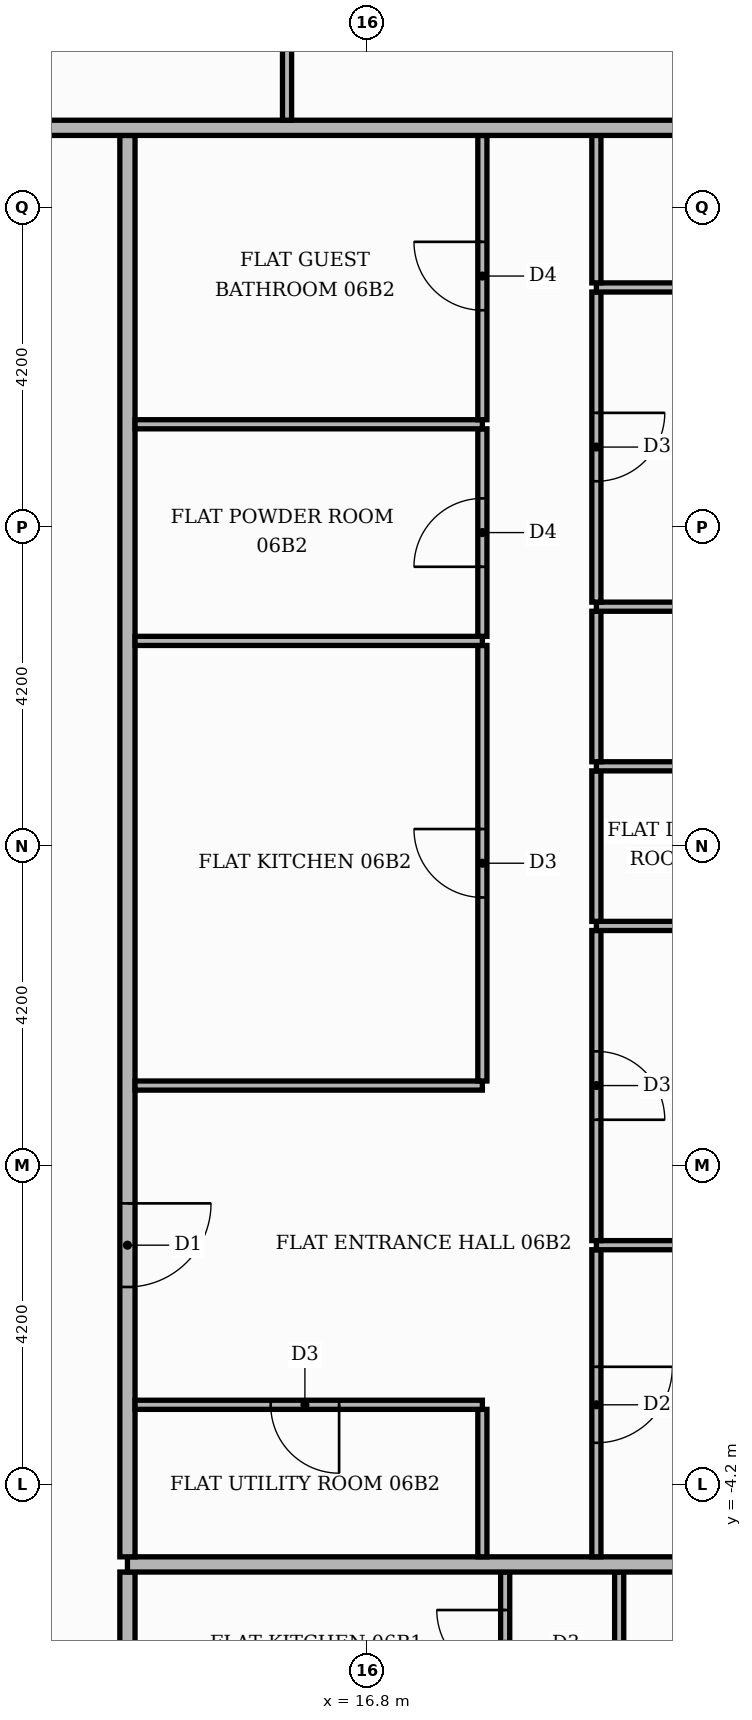
"""IFC4 building model, lengths in metres.
Left out: names, types, materials, properties, quantities, classifications, styles, units other than length and angle.
Written with IfcOpenShell. Run it as: python <this file> out.ifc"""

import sys

from ifc_helpers import new_model, si_unit, direction, frame, frame_2d, origin, place, context, subcontext, project, spatial, rectangle, extrude, element, fill, save


model = new_model("IFC4")
c1 = context("Model", 3, precision=1e-05, world=origin(), true_north=direction((0.0, 1.0)))
c2 = subcontext(c1, "Body", "Model", "MODEL_VIEW")
j1 = project(units=[si_unit("LENGTHUNIT", "METRE"), si_unit("PLANEANGLEUNIT", "RADIAN")], contexts=[c1])
p1 = place(None, origin())
s1 = spatial("IfcSite", under=j1, at=p1, CompositionType="ELEMENT")
p2 = place(p1, origin())
s2 = spatial("IfcBuilding", under=s1, at=p2, CompositionType="ELEMENT")
p3 = place(p2, frame((0.0, 0.0, 30.9)))
s3 = spatial("IfcBuildingStorey", under=s2, at=p3, CompositionType="ELEMENT", Elevation=30.9)
p4 = place(p3, frame((13.65, -13.55, 0.0), z_axis=(0.0, 0.0, 1.0), x_axis=(0.0, 1.0, 0.0)))
e1 = element("IfcWall", 1, at=p4, inside=s3, PredefinedType="PARTITIONING", context=c2, shape_type="SweptSolid", body=[
    extrude(rectangle(XDim=8.2, YDim=0.2, at=frame_2d((4.1, 0.0))), origin(), (0.0, 0.0, 1.0), 3.48),
])
p5 = place(p4, frame((1.45, 0.0, 0.0)))
e2 = element("IfcOpeningElement", 2, at=p5, cuts=e1, PredefinedType="OPENING", context=c2, shape_type="SweptSolid", body=[
    extrude(rectangle(XDim=1.1, YDim=2.4, at=frame_2d((0.55, 1.2))), frame((0.0, 0.11, 0.0), z_axis=(0.0, -1.0, 0.0), x_axis=(1.0, 0.0, 0.0)), (0.0, 0.0, 1.0), 0.22),
])
p6 = place(p3, frame((18.62, -7.29, 0.0), z_axis=(0.0, 0.0, 1.0), x_axis=(0.0, 1.0, 0.0)))
e3 = element("IfcWall", 3, at=p6, inside=s3, PredefinedType="PARTITIONING", context=c2, shape_type="SweptSolid", body=[
    extrude(rectangle(XDim=1.94, YDim=0.12, at=frame_2d((0.97, 0.0))), origin(), (0.0, 0.0, 1.0), 3.48),
])
p7 = place(p6, frame((0.54, 0.0, 0.0)))
e4 = element("IfcOpeningElement", 4, at=p7, cuts=e3, PredefinedType="OPENING", context=c2, shape_type="SweptSolid", body=[
    extrude(rectangle(XDim=0.9, YDim=2.1, at=frame_2d((0.45, 1.05))), frame((0.0, 0.07, 0.0), z_axis=(0.0, -1.0, 0.0), x_axis=(1.0, 0.0, 0.0)), (0.0, 0.0, 1.0), 0.14),
])
p8 = place(p3, frame((20.12, -7.29, 0.0), z_axis=(0.0, 0.0, 1.0), x_axis=(0.0, 1.0, 0.0)))
e5 = element("IfcWall", 5, at=p8, inside=s3, PredefinedType="PARTITIONING", context=c2, shape_type="SweptSolid", body=[
    extrude(rectangle(XDim=1.94, YDim=0.12, at=frame_2d((0.97, 0.0))), origin(), (0.0, 0.0, 1.0), 3.48),
])
p9 = place(p3, frame((13.65, -5.25, 0.0), z_axis=(0.0, 0.0, 1.0), x_axis=(1.0, 0.0, 0.0)))
e6 = element("IfcWall", 6, at=p9, inside=s3, PredefinedType="PARTITIONING", context=c2, shape_type="SweptSolid", body=[
    extrude(rectangle(XDim=11.77, YDim=0.2, at=frame_2d((5.885, 0.0))), origin(), (0.0, 0.0, 1.0), 3.48),
])
p10 = place(p3, frame((13.65, -5.15, 0.0), z_axis=(0.0, 0.0, 1.0), x_axis=(0.0, 1.0, 0.0)))
e7 = element("IfcWall", 7, at=p10, inside=s3, PredefinedType="PARTITIONING", context=c2, shape_type="SweptSolid", body=[
    extrude(rectangle(XDim=18.7, YDim=0.2, at=frame_2d((9.35, 0.0))), origin(), (0.0, 0.0, 1.0), 3.48),
])
p11 = place(p10, frame((3.55, 0.0, 0.0)))
e8 = element("IfcOpeningElement", 8, at=p11, cuts=e7, PredefinedType="OPENING", context=c2, shape_type="SweptSolid", body=[
    extrude(rectangle(XDim=1.1, YDim=2.4, at=frame_2d((0.55, 1.2))), frame((0.0, 0.11, 0.0), z_axis=(0.0, -1.0, 0.0), x_axis=(1.0, 0.0, 0.0)), (0.0, 0.0, 1.0), 0.22),
])
p12 = place(p3, frame((18.32, -5.15, 0.0), z_axis=(0.0, 0.0, 1.0), x_axis=(0.0, 1.0, 0.0)))
e9 = element("IfcWall", 9, at=p12, inside=s3, PredefinedType="PARTITIONING", context=c2, shape_type="SweptSolid", body=[
    extrude(rectangle(XDim=1.94, YDim=0.12, at=frame_2d((0.97, 0.0))), origin(), (0.0, 0.0, 1.0), 3.48),
])
p13 = place(p3, frame((19.82, -5.15, 0.0), z_axis=(0.0, 0.0, 1.0), x_axis=(0.0, 1.0, 0.0)))
e10 = element("IfcWall", 10, at=p13, inside=s3, PredefinedType="PARTITIONING", context=c2, shape_type="SweptSolid", body=[
    extrude(rectangle(XDim=4.04, YDim=0.12, at=frame_2d((2.02, 0.0))), origin(), (0.0, 0.0, 1.0), 3.48),
])
p14 = place(p13, frame((1.5, 0.0, 0.0)))
e11 = element("IfcOpeningElement", 11, at=p14, cuts=e10, PredefinedType="OPENING", context=c2, shape_type="SweptSolid", body=[
    extrude(rectangle(XDim=1.0, YDim=2.1, at=frame_2d((0.5, 1.05))), frame((0.0, 0.07, 0.0), z_axis=(0.0, -1.0, 0.0), x_axis=(1.0, 0.0, 0.0)), (0.0, 0.0, 1.0), 0.14),
])
p15 = place(p3, frame((13.75, -3.15, 0.0), z_axis=(0.0, 0.0, 1.0), x_axis=(1.0, 0.0, 0.0)))
e12 = element("IfcWall", 12, at=p15, inside=s3, PredefinedType="PARTITIONING", context=c2, shape_type="SweptSolid", body=[
    extrude(rectangle(XDim=4.57, YDim=0.12, at=frame_2d((2.285, 0.0))), origin(), (0.0, 0.0, 1.0), 3.48),
])
p16 = place(p15, frame((1.785, 0.0, 0.0)))
e13 = element("IfcOpeningElement", 13, at=p16, cuts=e12, PredefinedType="OPENING", context=c2, shape_type="SweptSolid", body=[
    extrude(rectangle(XDim=0.9, YDim=2.1, at=frame_2d((0.45, 1.05))), frame((0.0, 0.07, 0.0), z_axis=(0.0, -1.0, 0.0), x_axis=(1.0, 0.0, 0.0)), (0.0, 0.0, 1.0), 0.14),
])
p17 = place(p3, frame((19.82, -1.05, 0.0), z_axis=(0.0, 0.0, 1.0), x_axis=(1.0, 0.0, 0.0)))
e14 = element("IfcWall", 14, at=p17, inside=s3, PredefinedType="PARTITIONING", context=c2, shape_type="SweptSolid", body=[
    extrude(rectangle(XDim=5.6, YDim=0.12, at=frame_2d((2.8, 0.0))), origin(), (0.0, 0.0, 1.0), 3.48),
])
p18 = place(p3, frame((19.82, -0.99, 0.0), z_axis=(0.0, 0.0, 1.0), x_axis=(0.0, 1.0, 0.0)))
e15 = element("IfcWall", 15, at=p18, inside=s3, PredefinedType="PARTITIONING", context=c2, shape_type="SweptSolid", body=[
    extrude(rectangle(XDim=4.08, YDim=0.12, at=frame_2d((2.04, 0.0))), origin(), (0.0, 0.0, 1.0), 3.48),
])
p19 = place(p18, frame((1.59, 0.0, 0.0)))
e16 = element("IfcOpeningElement", 16, at=p19, cuts=e15, PredefinedType="OPENING", context=c2, shape_type="SweptSolid", body=[
    extrude(rectangle(XDim=0.9, YDim=2.1, at=frame_2d((0.45, 1.05))), frame((0.0, 0.07, 0.0), z_axis=(0.0, -1.0, 0.0), x_axis=(1.0, 0.0, 0.0)), (0.0, 0.0, 1.0), 0.14),
])
p20 = place(p3, frame((13.75, 1.05, 0.0), z_axis=(0.0, 0.0, 1.0), x_axis=(1.0, 0.0, 0.0)))
e17 = element("IfcWall", 17, at=p20, inside=s3, PredefinedType="PARTITIONING", context=c2, shape_type="SweptSolid", body=[
    extrude(rectangle(XDim=4.57, YDim=0.12, at=frame_2d((2.285, 0.0))), origin(), (0.0, 0.0, 1.0), 3.48),
])
p21 = place(p3, frame((18.32, 1.11, 0.0), z_axis=(0.0, 0.0, 1.0), x_axis=(0.0, 1.0, 0.0)))
e18 = element("IfcWall", 18, at=p21, inside=s3, PredefinedType="PARTITIONING", context=c2, shape_type="SweptSolid", body=[
    extrude(rectangle(XDim=5.73, YDim=0.12, at=frame_2d((2.865, 0.0))), origin(), (0.0, 0.0, 1.0), 3.48),
])
p22 = place(p21, frame((2.415, 0.0, 0.0)))
e19 = element("IfcOpeningElement", 19, at=p22, cuts=e18, PredefinedType="OPENING", context=c2, shape_type="SweptSolid", body=[
    extrude(rectangle(XDim=0.9, YDim=2.1, at=frame_2d((0.45, 1.05))), frame((0.0, 0.07, 0.0), z_axis=(0.0, -1.0, 0.0), x_axis=(1.0, 0.0, 0.0)), (0.0, 0.0, 1.0), 0.14),
])
p23 = place(p3, frame((19.82, 3.15, 0.0), z_axis=(0.0, 0.0, 1.0), x_axis=(1.0, 0.0, 0.0)))
e20 = element("IfcWall", 20, at=p23, inside=s3, PredefinedType="PARTITIONING", context=c2, shape_type="SweptSolid", body=[
    extrude(rectangle(XDim=5.6, YDim=0.12, at=frame_2d((2.8, 0.0))), origin(), (0.0, 0.0, 1.0), 3.48),
])
p24 = place(p23, frame((2.5, 0.0, 0.0)))
e21 = element("IfcOpeningElement", 21, at=p24, cuts=e20, PredefinedType="OPENING", context=c2, shape_type="SweptSolid", body=[
    extrude(rectangle(XDim=0.9, YDim=2.1, at=frame_2d((0.45, 1.05))), frame((0.0, 0.07, 0.0), z_axis=(0.0, -1.0, 0.0), x_axis=(1.0, 0.0, 0.0)), (0.0, 0.0, 1.0), 0.14),
])
p25 = place(p3, frame((19.82, 3.21, 0.0), z_axis=(0.0, 0.0, 1.0), x_axis=(0.0, 1.0, 0.0)))
e22 = element("IfcWall", 22, at=p25, inside=s3, PredefinedType="PARTITIONING", context=c2, shape_type="SweptSolid", body=[
    extrude(rectangle(XDim=1.98, YDim=0.12, at=frame_2d((0.99, 0.0))), origin(), (0.0, 0.0, 1.0), 3.48),
])
p26 = place(p3, frame((19.82, 5.25, 0.0), z_axis=(0.0, 0.0, 1.0), x_axis=(1.0, 0.0, 0.0)))
e23 = element("IfcWall", 23, at=p26, inside=s3, PredefinedType="PARTITIONING", context=c2, shape_type="SweptSolid", body=[
    extrude(rectangle(XDim=5.6, YDim=0.12, at=frame_2d((2.8, 0.0))), origin(), (0.0, 0.0, 1.0), 3.48),
])
p27 = place(p26, frame((2.5, 0.0, 0.0)))
e24 = element("IfcOpeningElement", 24, at=p27, cuts=e23, PredefinedType="OPENING", context=c2, shape_type="SweptSolid", body=[
    extrude(rectangle(XDim=0.9, YDim=2.1, at=frame_2d((0.45, 1.05))), frame((0.0, 0.07, 0.0), z_axis=(0.0, -1.0, 0.0), x_axis=(1.0, 0.0, 0.0)), (0.0, 0.0, 1.0), 0.14),
])
p28 = place(p3, frame((19.82, 5.31, 0.0), z_axis=(0.0, 0.0, 1.0), x_axis=(0.0, 1.0, 0.0)))
e25 = element("IfcWall", 25, at=p28, inside=s3, PredefinedType="PARTITIONING", context=c2, shape_type="SweptSolid", body=[
    extrude(rectangle(XDim=1.98, YDim=0.12, at=frame_2d((0.99, 0.0))), origin(), (0.0, 0.0, 1.0), 3.48),
])
p29 = place(p3, frame((13.75, 6.9, 0.0), z_axis=(0.0, 0.0, 1.0), x_axis=(1.0, 0.0, 0.0)))
e26 = element("IfcWall", 26, at=p29, inside=s3, PredefinedType="PARTITIONING", context=c2, shape_type="SweptSolid", body=[
    extrude(rectangle(XDim=4.57, YDim=0.12, at=frame_2d((2.285, 0.0))), origin(), (0.0, 0.0, 1.0), 3.48),
])
p30 = place(p3, frame((18.32, 6.96, 0.0), z_axis=(0.0, 0.0, 1.0), x_axis=(0.0, 1.0, 0.0)))
e27 = element("IfcWall", 27, at=p30, inside=s3, PredefinedType="PARTITIONING", context=c2, shape_type="SweptSolid", body=[
    extrude(rectangle(XDim=2.73, YDim=0.12, at=frame_2d((1.365, 0.0))), origin(), (0.0, 0.0, 1.0), 3.48),
])
p31 = place(p30, frame((0.915, 0.0, 0.0)))
e28 = element("IfcOpeningElement", 28, at=p31, cuts=e27, PredefinedType="OPENING", context=c2, shape_type="SweptSolid", body=[
    extrude(rectangle(XDim=0.9, YDim=2.1, at=frame_2d((0.45, 1.05))), frame((0.0, 0.07, 0.0), z_axis=(0.0, -1.0, 0.0), x_axis=(1.0, 0.0, 0.0)), (0.0, 0.0, 1.0), 0.14),
])
p32 = place(p3, frame((19.82, 7.35, 0.0), z_axis=(0.0, 0.0, 1.0), x_axis=(1.0, 0.0, 0.0)))
e29 = element("IfcWall", 29, at=p32, inside=s3, PredefinedType="PARTITIONING", context=c2, shape_type="SweptSolid", body=[
    extrude(rectangle(XDim=5.6, YDim=0.12, at=frame_2d((2.8, 0.0))), origin(), (0.0, 0.0, 1.0), 3.48),
])
p33 = place(p3, frame((19.82, 7.41, 0.0), z_axis=(0.0, 0.0, 1.0), x_axis=(0.0, 1.0, 0.0)))
e30 = element("IfcWall", 30, at=p33, inside=s3, PredefinedType="PARTITIONING", context=c2, shape_type="SweptSolid", body=[
    extrude(rectangle(XDim=4.08, YDim=0.12, at=frame_2d((2.04, 0.0))), origin(), (0.0, 0.0, 1.0), 3.48),
])
p34 = place(p33, frame((1.59, 0.0, 0.0)))
e31 = element("IfcOpeningElement", 31, at=p34, cuts=e30, PredefinedType="OPENING", context=c2, shape_type="SweptSolid", body=[
    extrude(rectangle(XDim=0.9, YDim=2.1, at=frame_2d((0.45, 1.05))), frame((0.0, 0.07, 0.0), z_axis=(0.0, -1.0, 0.0), x_axis=(1.0, 0.0, 0.0)), (0.0, 0.0, 1.0), 0.14),
])
p35 = place(p3, frame((13.75, 9.75, 0.0), z_axis=(0.0, 0.0, 1.0), x_axis=(1.0, 0.0, 0.0)))
e32 = element("IfcWall", 32, at=p35, inside=s3, PredefinedType="PARTITIONING", context=c2, shape_type="SweptSolid", body=[
    extrude(rectangle(XDim=4.57, YDim=0.12, at=frame_2d((2.285, 0.0))), origin(), (0.0, 0.0, 1.0), 3.48),
])
p36 = place(p3, frame((18.32, 9.81, 0.0), z_axis=(0.0, 0.0, 1.0), x_axis=(0.0, 1.0, 0.0)))
e33 = element("IfcWall", 33, at=p36, inside=s3, PredefinedType="PARTITIONING", context=c2, shape_type="SweptSolid", body=[
    extrude(rectangle(XDim=3.74, YDim=0.12, at=frame_2d((1.87, 0.0))), origin(), (0.0, 0.0, 1.0), 3.48),
])
p37 = place(p36, frame((1.44, 0.0, 0.0)))
e34 = element("IfcOpeningElement", 34, at=p37, cuts=e33, PredefinedType="OPENING", context=c2, shape_type="SweptSolid", body=[
    extrude(rectangle(XDim=0.9, YDim=2.1, at=frame_2d((0.45, 1.05))), frame((0.0, 0.07, 0.0), z_axis=(0.0, -1.0, 0.0), x_axis=(1.0, 0.0, 0.0)), (0.0, 0.0, 1.0), 0.14),
])
p38 = place(p3, frame((19.82, 11.55, 0.0), z_axis=(0.0, 0.0, 1.0), x_axis=(1.0, 0.0, 0.0)))
e35 = element("IfcWall", 35, at=p38, inside=s3, PredefinedType="PARTITIONING", context=c2, shape_type="SweptSolid", body=[
    extrude(rectangle(XDim=5.6, YDim=0.12, at=frame_2d((2.8, 0.0))), origin(), (0.0, 0.0, 1.0), 3.48),
])
p39 = place(p38, frame((2.5, 0.0, 0.0)))
e36 = element("IfcOpeningElement", 36, at=p39, cuts=e35, PredefinedType="OPENING", context=c2, shape_type="SweptSolid", body=[
    extrude(rectangle(XDim=0.9, YDim=2.1, at=frame_2d((0.45, 1.05))), frame((0.0, 0.07, 0.0), z_axis=(0.0, -1.0, 0.0), x_axis=(1.0, 0.0, 0.0)), (0.0, 0.0, 1.0), 0.14),
])
p40 = place(p3, frame((19.82, 11.61, 0.0), z_axis=(0.0, 0.0, 1.0), x_axis=(0.0, 1.0, 0.0)))
e37 = element("IfcWall", 37, at=p40, inside=s3, PredefinedType="PARTITIONING", context=c2, shape_type="SweptSolid", body=[
    extrude(rectangle(XDim=1.94, YDim=0.12, at=frame_2d((0.97, 0.0))), origin(), (0.0, 0.0, 1.0), 3.48),
])
p41 = place(p3, frame((-13.65, 13.65, 0.0), z_axis=(0.0, 0.0, 1.0), x_axis=(1.0, 0.0, 0.0)))
e38 = element("IfcWall", 38, at=p41, inside=s3, PredefinedType="PARTITIONING", context=c2, shape_type="SweptSolid", body=[
    extrude(rectangle(XDim=39.07, YDim=0.2, at=frame_2d((19.535, 0.0))), origin(), (0.0, 0.0, 1.0), 3.48),
])
p42 = place(p41, frame((24.65, 0.0, 0.0)))
e39 = element("IfcOpeningElement", 39, at=p42, cuts=e38, PredefinedType="OPENING", context=c2, shape_type="SweptSolid", body=[
    extrude(rectangle(XDim=1.1, YDim=2.4, at=frame_2d((0.55, 1.2))), frame((0.0, 0.11, 0.0), z_axis=(0.0, -1.0, 0.0), x_axis=(1.0, 0.0, 0.0)), (0.0, 0.0, 1.0), 0.22),
])
p43 = place(p41, frame((14.15, 0.0, 0.0)))
e40 = element("IfcOpeningElement", 40, at=p43, cuts=e38, PredefinedType="OPENING", context=c2, shape_type="SweptSolid", body=[
    extrude(rectangle(XDim=1.1, YDim=2.4, at=frame_2d((0.55, 1.2))), frame((0.0, 0.11, 0.0), z_axis=(0.0, -1.0, 0.0), x_axis=(1.0, 0.0, 0.0)), (0.0, 0.0, 1.0), 0.22),
])
p44 = place(p3, frame((15.75, 13.75, 0.0), z_axis=(0.0, 0.0, 1.0), x_axis=(0.0, 1.0, 0.0)))
e41 = element("IfcWall", 41, at=p44, inside=s3, PredefinedType="PARTITIONING", context=c2, shape_type="SweptSolid", body=[
    extrude(rectangle(XDim=6.01, YDim=0.12, at=frame_2d((3.005, 0.0))), origin(), (0.0, 0.0, 1.0), 3.48),
])
p45 = place(p44, frame((2.485, 0.0, 0.0)))
e42 = element("IfcOpeningElement", 42, at=p45, cuts=e41, PredefinedType="OPENING", context=c2, shape_type="SweptSolid", body=[
    extrude(rectangle(XDim=1.0, YDim=2.1, at=frame_2d((0.5, 1.05))), frame((0.0, 0.07, 0.0), z_axis=(0.0, -1.0, 0.0), x_axis=(1.0, 0.0, 0.0)), (0.0, 0.0, 1.0), 0.14),
])
p46 = place(p7, origin())
e43 = element("IfcDoor", 43, at=p46, inside=s3, OperationType="SINGLE_SWING_RIGHT", PredefinedType="DOOR", context=c2, shape_type="SweptSolid", body=[
    extrude(rectangle(XDim=0.9, YDim=2.1, at=frame_2d((0.45, 1.05))), frame((0.0, 0.025, 0.0), z_axis=(0.0, -1.0, 0.0), x_axis=(1.0, 0.0, 0.0)), (0.0, 0.0, 1.0), 0.05),
])
fill(e4, e43)
p47 = place(p11, frame((1.1, 0.0, 0.0), z_axis=(0.0, 0.0, 1.0), x_axis=(-1.0, 0.0, 0.0)))
e44 = element("IfcDoor", 44, at=p47, inside=s3, OperationType="SINGLE_SWING_RIGHT", PredefinedType="DOOR", context=c2, shape_type="SweptSolid", body=[
    extrude(rectangle(XDim=1.1, YDim=2.4, at=frame_2d((0.55, 1.2))), frame((0.0, 0.025, 0.0), z_axis=(0.0, -1.0, 0.0), x_axis=(1.0, 0.0, 0.0)), (0.0, 0.0, 1.0), 0.05),
])
fill(e8, e44)
p48 = place(p16, frame((0.9, 0.0, 0.0), z_axis=(0.0, 0.0, 1.0), x_axis=(-1.0, 0.0, 0.0)))
e45 = element("IfcDoor", 45, at=p48, inside=s3, OperationType="SINGLE_SWING_RIGHT", PredefinedType="DOOR", context=c2, shape_type="SweptSolid", body=[
    extrude(rectangle(XDim=0.9, YDim=2.1, at=frame_2d((0.45, 1.05))), frame((0.0, 0.025, 0.0), z_axis=(0.0, -1.0, 0.0), x_axis=(1.0, 0.0, 0.0)), (0.0, 0.0, 1.0), 0.05),
])
fill(e13, e45)
p49 = place(p22, origin())
e46 = element("IfcDoor", 46, at=p49, inside=s3, OperationType="SINGLE_SWING_RIGHT", PredefinedType="DOOR", context=c2, shape_type="SweptSolid", body=[
    extrude(rectangle(XDim=0.9, YDim=2.1, at=frame_2d((0.45, 1.05))), frame((0.0, 0.025, 0.0), z_axis=(0.0, -1.0, 0.0), x_axis=(1.0, 0.0, 0.0)), (0.0, 0.0, 1.0), 0.05),
])
fill(e19, e46)
p50 = place(p31, origin())
e47 = element("IfcDoor", 47, at=p50, inside=s3, OperationType="SINGLE_SWING_LEFT", PredefinedType="DOOR", context=c2, shape_type="SweptSolid", body=[
    extrude(rectangle(XDim=0.9, YDim=2.1, at=frame_2d((0.45, 1.05))), frame((0.0, 0.025, 0.0), z_axis=(0.0, -1.0, 0.0), x_axis=(1.0, 0.0, 0.0)), (0.0, 0.0, 1.0), 0.05),
])
fill(e28, e47)
p51 = place(p37, origin())
e48 = element("IfcDoor", 48, at=p51, inside=s3, OperationType="SINGLE_SWING_RIGHT", PredefinedType="DOOR", context=c2, shape_type="SweptSolid", body=[
    extrude(rectangle(XDim=0.9, YDim=2.1, at=frame_2d((0.45, 1.05))), frame((0.0, 0.025, 0.0), z_axis=(0.0, -1.0, 0.0), x_axis=(1.0, 0.0, 0.0)), (0.0, 0.0, 1.0), 0.05),
])
fill(e34, e48)
p52 = place(p14, frame((1.0, 0.0, 0.0), z_axis=(0.0, 0.0, 1.0), x_axis=(-1.0, 0.0, 0.0)))
e49 = element("IfcDoor", 49, at=p52, inside=s3, OperationType="SINGLE_SWING_RIGHT", PredefinedType="DOOR", context=c2, shape_type="SweptSolid", body=[
    extrude(rectangle(XDim=1.0, YDim=2.1, at=frame_2d((0.5, 1.05))), frame((0.0, 0.025, 0.0), z_axis=(0.0, -1.0, 0.0), x_axis=(1.0, 0.0, 0.0)), (0.0, 0.0, 1.0), 0.05),
])
fill(e11, e49)
p53 = place(p19, frame((0.9, 0.0, 0.0), z_axis=(0.0, 0.0, 1.0), x_axis=(-1.0, 0.0, 0.0)))
e50 = element("IfcDoor", 50, at=p53, inside=s3, OperationType="SINGLE_SWING_LEFT", PredefinedType="DOOR", context=c2, shape_type="SweptSolid", body=[
    extrude(rectangle(XDim=0.9, YDim=2.1, at=frame_2d((0.45, 1.05))), frame((0.0, 0.025, 0.0), z_axis=(0.0, -1.0, 0.0), x_axis=(1.0, 0.0, 0.0)), (0.0, 0.0, 1.0), 0.05),
])
fill(e16, e50)
p54 = place(p34, frame((0.9, 0.0, 0.0), z_axis=(0.0, 0.0, 1.0), x_axis=(-1.0, 0.0, 0.0)))
e51 = element("IfcDoor", 51, at=p54, inside=s3, OperationType="SINGLE_SWING_RIGHT", PredefinedType="DOOR", context=c2, shape_type="SweptSolid", body=[
    extrude(rectangle(XDim=0.9, YDim=2.1, at=frame_2d((0.45, 1.05))), frame((0.0, 0.025, 0.0), z_axis=(0.0, -1.0, 0.0), x_axis=(1.0, 0.0, 0.0)), (0.0, 0.0, 1.0), 0.05),
])
fill(e31, e51)
save(model, sys.argv[1])
